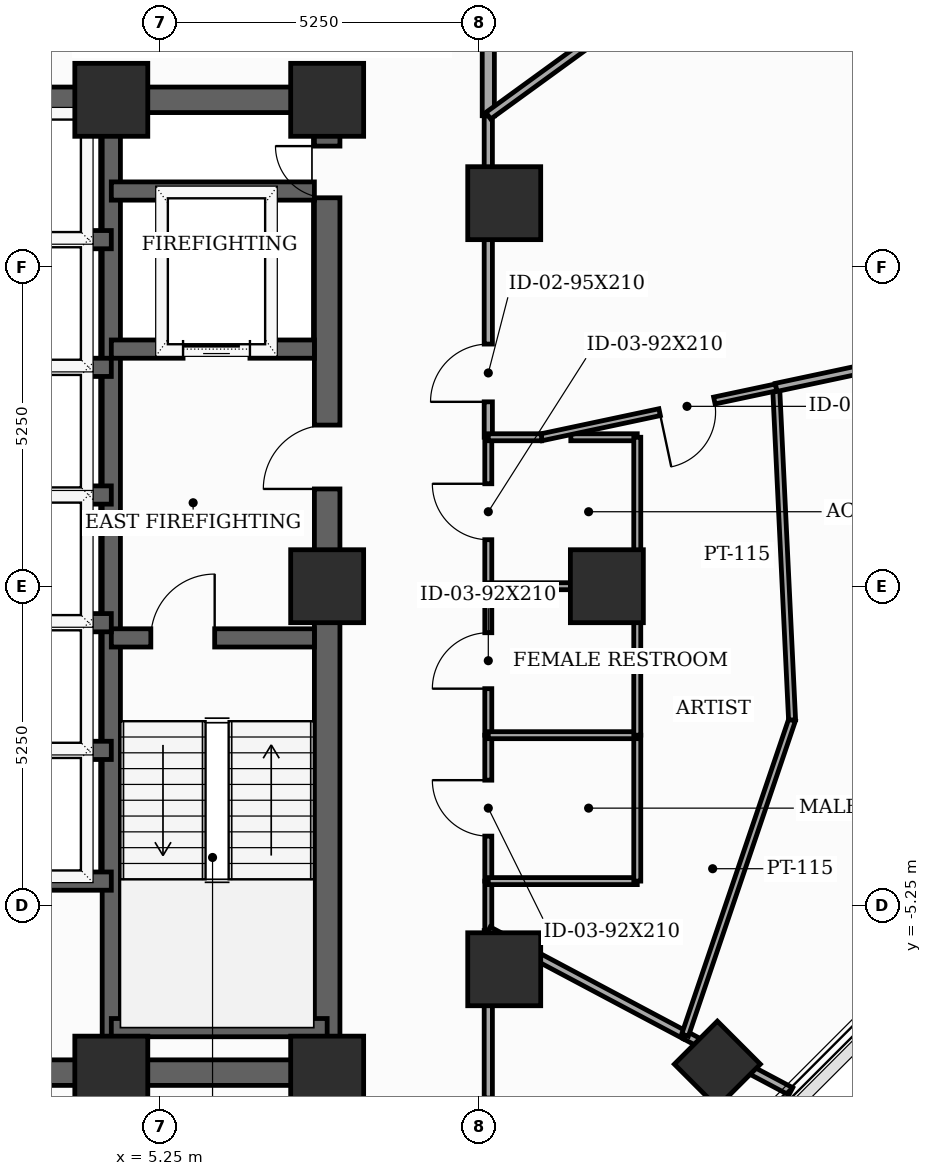
"""IFC4 building model, lengths in metres.
Left out: names, types, materials, properties, quantities, classifications, styles, units other than length and angle.
Written with IfcOpenShell. Run it as: python <this file> out.ifc"""

import sys

from ifc_helpers import new_model, si_unit, direction, frame, frame_2d, origin, origin_2d, place, context, subcontext, project, spatial, rectangle, extrude, element, fill, save


model = new_model("IFC4")
c1 = context("Model", 3, precision=1e-05, world=origin(), true_north=direction((0.0, 1.0)))
c2 = subcontext(c1, "Body", "Model", "MODEL_VIEW")
j1 = project(units=[si_unit("LENGTHUNIT", "METRE"), si_unit("PLANEANGLEUNIT", "RADIAN")], contexts=[c1])
p1 = place(None, origin())
s1 = spatial("IfcSite", under=j1, at=p1, CompositionType="ELEMENT")
p2 = place(p1, origin())
s2 = spatial("IfcBuilding", under=s1, at=p2, CompositionType="ELEMENT")
p3 = place(p2, frame((0.0, 0.0, 191.6)))
s3 = spatial("IfcBuildingStorey", under=s2, at=p3, CompositionType="ELEMENT", Elevation=191.6)
for number, where, z_axis, x_axis in (
    (1, (4.45, -8.0, 0.0), (0.0, 0.0, 1.0), (1.0, 0.0, 0.0)),
    (2, (8.0, -8.0, 0.0), (0.0, 0.0, 1.0), (1.0, 0.0, 0.0)),
    (3, (8.0, 0.0, 0.0), (0.0, 0.0, 1.0), (1.0, 0.0, 0.0)),
    (4, (8.0, 8.0, 0.0), (0.0, 0.0, 1.0), (1.0, 0.0, 0.0)),
    (5, (4.45, 8.0, 0.0), (0.0, 0.0, 1.0), (1.0, 0.0, 0.0)),
    (6, (12.6, 0.0, 0.0), (0.0, 0.0, 1.0), (1.0, 0.0, 0.0)),
    (7, (10.912, 6.3, 0.0), (0.0, 0.0, 1.0), (1.0, 0.0, 0.0)),
    (8, (10.912, -6.3, 0.0), (0.0, 0.0, 1.0), (1.0, 0.0, 0.0)),
):
    element("IfcColumn", number, at=place(p3, frame(where, z_axis=z_axis, x_axis=x_axis)), inside=s3, PredefinedType="COLUMN", context=c2, shape_type="SweptSolid", body=[
        extrude(rectangle(XDim=1.2, YDim=1.2, at=origin_2d()), origin(), (0.0, 0.0, 1.0), 3.7),
    ])
p4 = place(p3, frame((14.417, -7.861, 0.0), z_axis=(0.0, 0.0, 1.0), x_axis=(0.707106781187, 0.707106781187, 0.0)))
e9 = element("IfcColumn", 9, at=p4, inside=s3, PredefinedType="COLUMN", context=c2, shape_type="SweptSolid", body=[
    extrude(rectangle(XDim=1.0, YDim=1.0, at=origin_2d()), origin(), (0.0, 0.0, 1.0), 3.7),
])
p5 = place(p3, frame((8.0, -8.0, 0.0), z_axis=(0.0, 0.0, 1.0), x_axis=(0.0, 1.0, 0.0)))
e10 = element("IfcWall", 10, at=p5, inside=s3, PredefinedType="SHEAR", context=c2, shape_type="SweptSolid", body=[
    extrude(rectangle(XDim=16.0, YDim=0.42, at=frame_2d((8.0, 0.0))), origin(), (0.0, 0.0, 1.0), 3.5),
])
p6 = place(p5, frame((9.6, 0.0, 0.0)))
e11 = element("IfcOpeningElement", 11, at=p6, cuts=e10, PredefinedType="OPENING", context=c2, shape_type="SweptSolid", body=[
    extrude(rectangle(XDim=1.05, YDim=2.15, at=frame_2d((0.525, 1.075))), frame((0.0, 0.22, 0.0), z_axis=(0.0, -1.0, 0.0), x_axis=(1.0, 0.0, 0.0)), (0.0, 0.0, 1.0), 0.44),
])
p7 = place(p5, frame((14.389, 0.0, 0.0)))
e12 = element("IfcOpeningElement", 12, at=p7, cuts=e10, PredefinedType="OPENING", context=c2, shape_type="SweptSolid", body=[
    extrude(rectangle(XDim=0.85, YDim=2.02, at=frame_2d((0.425, 1.01))), frame((0.0, 0.22, 0.0), z_axis=(0.0, -1.0, 0.0), x_axis=(1.0, 0.0, 0.0)), (0.0, 0.0, 1.0), 0.44),
])
p8 = place(p3, frame((-8.0, -8.0, 0.0), z_axis=(0.0, 0.0, 1.0), x_axis=(1.0, 0.0, 0.0)))
e13 = element("IfcWall", 13, at=p8, inside=s3, PredefinedType="SHEAR", context=c2, shape_type="SweptSolid", body=[
    extrude(rectangle(XDim=16.0, YDim=0.42, at=frame_2d((8.0, 0.0))), origin(), (0.0, 0.0, 1.0), 3.5),
])
p9 = place(p8, frame((5.2, 0.0, 0.0)))
e14 = element("IfcOpeningElement", 14, at=p9, cuts=e13, PredefinedType="OPENING", context=c2, shape_type="SweptSolid", body=[
    extrude(rectangle(XDim=0.95, YDim=2.1, at=frame_2d((0.475, 1.05))), frame((0.0, 0.22, 0.0), z_axis=(0.0, -1.0, 0.0), x_axis=(1.0, 0.0, 0.0)), (0.0, 0.0, 1.0), 0.44),
])
p10 = place(p8, frame((9.8, 0.0, 0.0)))
e15 = element("IfcOpeningElement", 15, at=p10, cuts=e13, PredefinedType="OPENING", context=c2, shape_type="SweptSolid", body=[
    extrude(rectangle(XDim=0.95, YDim=2.1, at=frame_2d((0.475, 1.05))), frame((0.0, 0.22, 0.0), z_axis=(0.0, -1.0, 0.0), x_axis=(1.0, 0.0, 0.0)), (0.0, 0.0, 1.0), 0.44),
])
p11 = place(p3, frame((-8.0, 8.0, 0.0), z_axis=(0.0, 0.0, 1.0), x_axis=(1.0, 0.0, 0.0)))
e16 = element("IfcWall", 16, at=p11, inside=s3, PredefinedType="SHEAR", context=c2, shape_type="SweptSolid", body=[
    extrude(rectangle(XDim=16.0, YDim=0.42, at=frame_2d((8.0, 0.0))), origin(), (0.0, 0.0, 1.0), 3.5),
])
p12 = place(p11, frame((7.1, 0.0, 0.0)))
e17 = element("IfcOpeningElement", 17, at=p12, cuts=e16, PredefinedType="OPENING", context=c2, shape_type="SweptSolid", body=[
    extrude(rectangle(XDim=1.8, YDim=2.15, at=frame_2d((0.9, 1.075))), frame((0.0, 0.22, 0.0), z_axis=(0.0, -1.0, 0.0), x_axis=(1.0, 0.0, 0.0)), (0.0, 0.0, 1.0), 0.44),
])
p13 = place(p3, frame((4.45, -7.79, 0.0), z_axis=(0.0, 0.0, 1.0), x_axis=(0.0, 1.0, 0.0)))
e18 = element("IfcWall", 18, at=p13, inside=s3, PredefinedType="SHEAR", context=c2, shape_type="SweptSolid", body=[
    extrude(rectangle(XDim=15.58, YDim=0.3, at=frame_2d((7.79, 0.0))), origin(), (0.0, 0.0, 1.0), 3.5),
])
p14 = place(p3, frame((4.45, -0.85, 0.0), z_axis=(0.0, 0.0, 1.0), x_axis=(1.0, 0.0, 0.0)))
e19 = element("IfcWall", 19, at=p14, inside=s3, PredefinedType="SHEAR", context=c2, shape_type="SweptSolid", body=[
    extrude(rectangle(XDim=3.34, YDim=0.3, at=frame_2d((1.67, 0.0))), origin(), (0.0, 0.0, 1.0), 3.5),
])
p15 = place(p14, frame((0.65, 0.0, 0.0)))
e20 = element("IfcOpeningElement", 20, at=p15, cuts=e19, PredefinedType="OPENING", context=c2, shape_type="SweptSolid", body=[
    extrude(rectangle(XDim=1.05, YDim=2.15, at=frame_2d((0.525, 1.075))), frame((0.0, 0.16, 0.0), z_axis=(0.0, -1.0, 0.0), x_axis=(1.0, 0.0, 0.0)), (0.0, 0.0, 1.0), 0.32),
])
p16 = place(p3, frame((4.45, -7.26, 0.0), z_axis=(0.0, 0.0, 1.0), x_axis=(1.0, 0.0, 0.0)))
e21 = element("IfcWall", 21, at=p16, inside=s3, PredefinedType="SHEAR", context=c2, shape_type="SweptSolid", body=[
    extrude(rectangle(XDim=3.55, YDim=0.3, at=frame_2d((1.775, 0.0))), origin(), (0.0, 0.0, 1.0), 3.5),
])
p17 = place(p3, frame((4.45, 3.9, 0.0), z_axis=(0.0, 0.0, 1.0), x_axis=(1.0, 0.0, 0.0)))
e22 = element("IfcWall", 22, at=p17, inside=s3, PredefinedType="SHEAR", context=c2, shape_type="SweptSolid", body=[
    extrude(rectangle(XDim=3.34, YDim=0.3, at=frame_2d((1.67, 0.0))), origin(), (0.0, 0.0, 1.0), 3.5),
])
p18 = place(p17, frame((1.18, 0.0, 0.0)))
e23 = element("IfcOpeningElement", 23, at=p18, cuts=e22, PredefinedType="OPENING", context=c2, shape_type="SweptSolid", body=[
    extrude(rectangle(XDim=1.1, YDim=2.1, at=frame_2d((0.55, 1.05))), frame((0.0, 0.16, 0.0), z_axis=(0.0, -1.0, 0.0), x_axis=(1.0, 0.0, 0.0)), (0.0, 0.0, 1.0), 0.32),
])
p19 = place(p3, frame((4.45, 6.5, 0.0), z_axis=(0.0, 0.0, 1.0), x_axis=(1.0, 0.0, 0.0)))
e24 = element("IfcWall", 24, at=p19, inside=s3, PredefinedType="SHEAR", context=c2, shape_type="SweptSolid", body=[
    extrude(rectangle(XDim=3.34, YDim=0.3, at=frame_2d((1.67, 0.0))), origin(), (0.0, 0.0, 1.0), 3.5),
])
p20 = place(p3, frame((-4.45, -4.85, 0.0), z_axis=(0.0, 0.0, 1.0), x_axis=(1.0, 0.0, 0.0)))
e25 = element("IfcWall", 25, at=p20, inside=s3, PredefinedType="SHEAR", context=c2, shape_type="SweptSolid", body=[
    extrude(rectangle(XDim=8.9, YDim=0.3, at=frame_2d((4.45, 0.0))), origin(), (0.0, 0.0, 1.0), 3.5),
])
for number, where, z_axis, x_axis in (
    (26, (1.68, 1.5, 0.0), (0.0, 0.0, 1.0), (1.0, 0.0, 0.0)),
    (27, (1.68, 3.6, 0.0), (0.0, 0.0, 1.0), (1.0, 0.0, 0.0)),
    (28, (1.68, 5.7, 0.0), (0.0, 0.0, 1.0), (1.0, 0.0, 0.0)),
    (29, (1.68, -2.7, 0.0), (0.0, 0.0, 1.0), (1.0, 0.0, 0.0)),
    (30, (1.68, -0.6, 0.0), (0.0, 0.0, 1.0), (1.0, 0.0, 0.0)),
):
    element("IfcWall", number, at=place(p3, frame(where, z_axis=z_axis, x_axis=x_axis)), inside=s3, PredefinedType="SHEAR", context=c2, shape_type="SweptSolid", body=[
        extrude(rectangle(XDim=2.77, YDim=0.3, at=frame_2d((1.385, 0.0))), origin(), (0.0, 0.0, 1.0), 3.5),
    ])
p21 = place(p3, frame((10.65, -10.15, 0.0), z_axis=(0.0, 0.0, 1.0), x_axis=(0.0, 1.0, 0.0)))
e31 = element("IfcWall", 31, at=p21, inside=s3, PredefinedType="PARTITIONING", context=c2, shape_type="SweptSolid", body=[
    extrude(rectangle(XDim=4.487, YDim=0.135, at=frame_2d((2.243, 0.0))), origin(), (0.0, 0.0, 1.0), 2.885),
])
p22 = place(p21, frame((0.781, 0.0, 0.0)))
e32 = element("IfcOpeningElement", 32, at=p22, cuts=e31, PredefinedType="OPENING", context=c2, shape_type="SweptSolid", body=[
    extrude(rectangle(XDim=0.95, YDim=2.1, at=frame_2d((0.475, 1.05))), frame((0.0, 0.077, 0.0), z_axis=(0.0, -1.0, 0.0), x_axis=(1.0, 0.0, 0.0)), (0.0, 0.0, 1.0), 0.155),
])
p23 = place(p3, frame((10.65, -4.85, 0.0), z_axis=(0.0, 0.0, 1.0), x_axis=(0.0, 1.0, 0.0)))
e33 = element("IfcWall", 33, at=p23, inside=s3, PredefinedType="PARTITIONING", context=c2, shape_type="SweptSolid", body=[
    extrude(rectangle(XDim=2.4, YDim=0.115, at=frame_2d((1.2, 0.0))), origin(), (0.0, 0.0, 1.0), 3.5),
])
p24 = place(p23, frame((0.74, 0.0, 0.0)))
e34 = element("IfcOpeningElement", 34, at=p24, cuts=e33, PredefinedType="OPENING", context=c2, shape_type="SweptSolid", body=[
    extrude(rectangle(XDim=0.92, YDim=2.1, at=frame_2d((0.46, 1.05))), frame((0.0, 0.067, 0.0), z_axis=(0.0, -1.0, 0.0), x_axis=(1.0, 0.0, 0.0)), (0.0, 0.0, 1.0), 0.135),
])
p25 = place(p3, frame((10.65, -5.663, 0.0), z_axis=(0.0, 0.0, 1.0), x_axis=(0.0, 1.0, 0.0)))
e35 = element("IfcWall", 35, at=p25, inside=s3, PredefinedType="PARTITIONING", context=c2, shape_type="SweptSolid", body=[
    extrude(rectangle(XDim=0.813, YDim=0.115, at=frame_2d((0.406, 0.0))), origin(), (0.0, 0.0, 1.0), 3.5),
])
p26 = place(p3, frame((10.65, -2.45, 0.0), z_axis=(0.0, 0.0, 1.0), x_axis=(0.0, 1.0, 0.0)))
e36 = element("IfcWall", 36, at=p26, inside=s3, PredefinedType="PARTITIONING", context=c2, shape_type="SweptSolid", body=[
    extrude(rectangle(XDim=2.45, YDim=0.115, at=frame_2d((1.225, 0.0))), origin(), (0.0, 0.0, 1.0), 2.885),
])
p27 = place(p26, frame((0.765, 0.0, 0.0)))
e37 = element("IfcOpeningElement", 37, at=p27, cuts=e36, PredefinedType="OPENING", context=c2, shape_type="SweptSolid", body=[
    extrude(rectangle(XDim=0.92, YDim=2.1, at=frame_2d((0.46, 1.05))), frame((0.0, 0.067, 0.0), z_axis=(0.0, -1.0, 0.0), x_axis=(1.0, 0.0, 0.0)), (0.0, 0.0, 1.0), 0.135),
])
p28 = place(p3, frame((10.65, 0.0, 0.0), z_axis=(0.0, 0.0, 1.0), x_axis=(0.0, 1.0, 0.0)))
e38 = element("IfcWall", 38, at=p28, inside=s3, PredefinedType="PARTITIONING", context=c2, shape_type="SweptSolid", body=[
    extrude(rectangle(XDim=2.45, YDim=0.115, at=frame_2d((1.225, 0.0))), origin(), (0.0, 0.0, 1.0), 2.885),
])
p29 = place(p28, frame((0.765, 0.0, 0.0)))
e39 = element("IfcOpeningElement", 39, at=p29, cuts=e38, PredefinedType="OPENING", context=c2, shape_type="SweptSolid", body=[
    extrude(rectangle(XDim=0.92, YDim=2.1, at=frame_2d((0.46, 1.05))), frame((0.0, 0.067, 0.0), z_axis=(0.0, -1.0, 0.0), x_axis=(1.0, 0.0, 0.0)), (0.0, 0.0, 1.0), 0.135),
])
p30 = place(p3, frame((10.65, 2.45, 0.0), z_axis=(0.0, 0.0, 1.0), x_axis=(0.0, 1.0, 0.0)))
e40 = element("IfcWall", 40, at=p30, inside=s3, PredefinedType="PARTITIONING", context=c2, shape_type="SweptSolid", body=[
    extrude(rectangle(XDim=5.288, YDim=0.135, at=frame_2d((2.644, 0.0))), origin(), (0.0, 0.0, 1.0), 2.885),
])
p31 = place(p30, frame((0.583, 0.0, 0.0)))
e41 = element("IfcOpeningElement", 41, at=p31, cuts=e40, PredefinedType="OPENING", context=c2, shape_type="SweptSolid", body=[
    extrude(rectangle(XDim=0.95, YDim=2.1, at=frame_2d((0.475, 1.05))), frame((0.0, 0.077, 0.0), z_axis=(0.0, -1.0, 0.0), x_axis=(1.0, 0.0, 0.0)), (0.0, 0.0, 1.0), 0.155),
])
p32 = place(p3, frame((10.65, 7.738, 0.0), z_axis=(0.0, 0.0, 1.0), x_axis=(0.0, 1.0, 0.0)))
e42 = element("IfcWall", 42, at=p32, inside=s3, PredefinedType="SOLIDWALL", context=c2, shape_type="SweptSolid", body=[
    extrude(rectangle(XDim=2.412, YDim=0.2, at=frame_2d((1.206, 0.0))), origin(), (0.0, 0.0, 1.0), 3.5),
])
p33 = place(p3, frame((13.886, -7.383, 0.0), z_axis=(0.0, 0.0, 1.0), x_axis=(-0.88302513666, 0.469325695041, 0.0)))
e43 = element("IfcWall", 43, at=p33, inside=s3, PredefinedType="PARTITIONING", context=c2, shape_type="SweptSolid", body=[
    extrude(rectangle(XDim=3.665, YDim=0.135, at=frame_2d((1.833, 0.0))), origin(), (0.0, 0.0, 1.0), 2.885),
])
p34 = place(p3, frame((15.625, -8.308, 0.0), z_axis=(0.0, 0.0, 1.0), x_axis=(-0.882966413063, 0.469436165418, 0.0)))
e44 = element("IfcWall", 44, at=p34, inside=s3, PredefinedType="PARTITIONING", context=c2, shape_type="SweptSolid", body=[
    extrude(rectangle(XDim=1.969, YDim=0.135, at=frame_2d((0.985, 0.0))), origin(), (0.0, 0.0, 1.0), 2.985),
])
p35 = place(p3, frame((10.65, -4.85, 0.0), z_axis=(0.0, 0.0, 1.0), x_axis=(1.0, 0.0, 0.0)))
e45 = element("IfcWall", 45, at=p35, inside=s3, PredefinedType="PARTITIONING", context=c2, shape_type="SweptSolid", body=[
    extrude(rectangle(XDim=2.45, YDim=0.115, at=frame_2d((1.225, 0.0))), origin(), (0.0, 0.0, 1.0), 2.885),
])
p36 = place(p3, frame((13.1, -4.85, 0.0), z_axis=(0.0, 0.0, 1.0), x_axis=(0.0, 1.0, 0.0)))
e46 = element("IfcWall", 46, at=p36, inside=s3, PredefinedType="PARTITIONING", context=c2, shape_type="SweptSolid", body=[
    extrude(rectangle(XDim=2.4, YDim=0.115, at=frame_2d((1.2, 0.0))), origin(), (0.0, 0.0, 1.0), 3.5),
])
p37 = place(p3, frame((13.1, -2.45, 0.0), z_axis=(0.0, 0.0, 1.0), x_axis=(-1.0, 0.0, 0.0)))
e47 = element("IfcWall", 47, at=p37, inside=s3, PredefinedType="PARTITIONING", context=c2, shape_type="SweptSolid", body=[
    extrude(rectangle(XDim=2.45, YDim=0.115, at=frame_2d((1.225, 0.0))), origin(), (0.0, 0.0, 1.0), 2.885),
])
p38 = place(p3, frame((13.1, 0.0, 0.0), z_axis=(0.0, 0.0, 1.0), x_axis=(0.0, -1.0, 0.0)))
e48 = element("IfcWall", 48, at=p38, inside=s3, PredefinedType="PARTITIONING", context=c2, shape_type="SweptSolid", body=[
    extrude(rectangle(XDim=2.45, YDim=0.115, at=frame_2d((1.225, 0.0))), origin(), (0.0, 0.0, 1.0), 2.985),
])
p39 = place(p3, frame((13.886, -7.383, 0.0), z_axis=(0.0, 0.0, 1.0), x_axis=(0.321480582018, 0.946916171255, 0.0)))
e49 = element("IfcWall", 49, at=p39, inside=s3, PredefinedType="PARTITIONING", context=c2, shape_type="SweptSolid", body=[
    extrude(rectangle(XDim=5.475, YDim=0.115, at=frame_2d((2.737, 0.0))), origin(), (0.0, 0.0, 1.0), 3.5),
])
p40 = place(p3, frame((15.646, -2.199, 0.0), z_axis=(0.0, 0.0, 1.0), x_axis=(-0.047844791808, 0.998854782187, 0.0)))
e50 = element("IfcWall", 50, at=p40, inside=s3, PredefinedType="PARTITIONING", context=c2, shape_type="SweptSolid", body=[
    extrude(rectangle(XDim=5.475, YDim=0.115, at=frame_2d((2.738, 0.0))), origin(), (0.0, 0.0, 1.0), 2.985),
])
p41 = place(p3, frame((12.007, 2.45, 0.0), z_axis=(0.0, 0.0, 1.0), x_axis=(1.0, 0.0, 0.0)))
e51 = element("IfcWall", 51, at=p41, inside=s3, PredefinedType="PARTITIONING", context=c2, shape_type="SweptSolid", body=[
    extrude(rectangle(XDim=1.093, YDim=0.115, at=frame_2d((0.546, 0.0))), origin(), (0.0, 0.0, 1.0), 2.885),
])
p42 = place(p3, frame((13.1, 2.45, 0.0), z_axis=(0.0, 0.0, 1.0), x_axis=(0.0, -1.0, 0.0)))
e52 = element("IfcWall", 52, at=p42, inside=s3, PredefinedType="PARTITIONING", context=c2, shape_type="SweptSolid", body=[
    extrude(rectangle(XDim=2.45, YDim=0.115, at=frame_2d((1.225, 0.0))), origin(), (0.0, 0.0, 1.0), 2.985),
])
p43 = place(p3, frame((15.384, 3.27, 0.0), z_axis=(0.0, 0.0, 1.0), x_axis=(-0.978147995284, -0.207909834598, 0.0)))
e53 = element("IfcWall", 53, at=p43, inside=s3, PredefinedType="PARTITIONING", context=c2, shape_type="SweptSolid", body=[
    extrude(rectangle(XDim=3.944, YDim=0.115, at=frame_2d((1.972, 0.0))), origin(), (0.0, 0.0, 1.0), 2.885),
])
p44 = place(p43, frame((1.039, 0.0, 0.0)))
e54 = element("IfcOpeningElement", 54, at=p44, cuts=e53, PredefinedType="OPENING", context=c2, shape_type="SweptSolid", body=[
    extrude(rectangle(XDim=0.92, YDim=2.1, at=frame_2d((0.46, 1.05))), frame((0.0, 0.067, 0.0), z_axis=(0.0, -1.0, 0.0), x_axis=(1.0, 0.0, 0.0)), (0.0, 0.0, 1.0), 0.135),
])
p45 = place(p3, frame((13.1, 0.0, 0.0), z_axis=(0.0, 0.0, 1.0), x_axis=(-1.0, 0.0, 0.0)))
e55 = element("IfcWall", 55, at=p45, inside=s3, PredefinedType="PARTITIONING", context=c2, shape_type="SweptSolid", body=[
    extrude(rectangle(XDim=2.45, YDim=0.115, at=frame_2d((1.225, 0.0))), origin(), (0.0, 0.0, 1.0), 2.885),
])
p46 = place(p3, frame((29.271, 6.221, 0.0), z_axis=(0.0, 0.0, 1.0), x_axis=(-0.978151114267, -0.207895160259, 0.0)))
e56 = element("IfcWall", 56, at=p46, inside=s3, PredefinedType="PARTITIONING", context=c2, shape_type="SweptSolid", body=[
    extrude(rectangle(XDim=14.197, YDim=0.135, at=frame_2d((7.098, 0.0))), origin(), (0.0, 0.0, 1.0), 2.985),
])
p47 = place(p46, frame((6.638, 0.0, 0.0)))
e57 = element("IfcOpeningElement", 57, at=p47, cuts=e56, PredefinedType="OPENING", context=c2, shape_type="SweptSolid", body=[
    extrude(rectangle(XDim=0.92, YDim=2.1, at=frame_2d((0.46, 1.05))), frame((0.0, 0.077, 0.0), z_axis=(0.0, -1.0, 0.0), x_axis=(1.0, 0.0, 0.0)), (0.0, 0.0, 1.0), 0.155),
])
p48 = place(p3, frame((11.526, 2.45, 0.0), z_axis=(0.0, 0.0, 1.0), x_axis=(-1.0, 0.0, 0.0)))
e58 = element("IfcWall", 58, at=p48, inside=s3, PredefinedType="PARTITIONING", context=c2, shape_type="SweptSolid", body=[
    extrude(rectangle(XDim=0.876, YDim=0.115, at=frame_2d((0.438, 0.0))), origin(), (0.0, 0.0, 1.0), 3.5),
])
p49 = place(p3, frame((12.738, 9.255, 0.0), z_axis=(0.0, 0.0, 1.0), x_axis=(-0.809067292609, -0.587716016483, 0.0)))
e59 = element("IfcWall", 59, at=p49, inside=s3, PredefinedType="PARTITIONING", context=c2, shape_type="SweptSolid", body=[
    extrude(rectangle(XDim=2.581, YDim=0.135, at=frame_2d((1.291, 0.0))), origin(), (0.0, 0.0, 1.0), 3.5),
])
p50 = place(p6, origin())
e60 = element("IfcDoor", 60, at=p50, inside=s3, OperationType="SINGLE_SWING_LEFT", PredefinedType="DOOR", context=c2, shape_type="SweptSolid", body=[
    extrude(rectangle(XDim=1.05, YDim=2.15, at=frame_2d((0.525, 1.075))), frame((0.0, 0.025, 0.0), z_axis=(0.0, -1.0, 0.0), x_axis=(1.0, 0.0, 0.0)), (0.0, 0.0, 1.0), 0.05),
])
fill(e11, e60)
p51 = place(p7, origin())
e61 = element("IfcDoor", 61, at=p51, inside=s3, OperationType="SINGLE_SWING_RIGHT", PredefinedType="TRAPDOOR", context=c2, shape_type="SweptSolid", body=[
    extrude(rectangle(XDim=0.85, YDim=2.02, at=frame_2d((0.425, 1.01))), frame((0.0, 0.025, 0.0), z_axis=(0.0, -1.0, 0.0), x_axis=(1.0, 0.0, 0.0)), (0.0, 0.0, 1.0), 0.05),
])
fill(e12, e61)
p52 = place(p15, origin())
e62 = element("IfcDoor", 62, at=p52, inside=s3, OperationType="SINGLE_SWING_RIGHT", PredefinedType="DOOR", context=c2, shape_type="SweptSolid", body=[
    extrude(rectangle(XDim=1.05, YDim=2.15, at=frame_2d((0.525, 1.075))), frame((0.0, 0.025, 0.0), z_axis=(0.0, -1.0, 0.0), x_axis=(1.0, 0.0, 0.0)), (0.0, 0.0, 1.0), 0.05),
])
fill(e20, e62)
p53 = place(p18, origin())
e63 = element("IfcDoor", 63, at=p53, inside=s3, OperationType="SLIDING_TO_LEFT", PredefinedType="DOOR", context=c2, shape_type="SweptSolid", body=[
    extrude(rectangle(XDim=1.1, YDim=2.1, at=frame_2d((0.55, 1.05))), frame((0.0, 0.025, 0.0), z_axis=(0.0, -1.0, 0.0), x_axis=(1.0, 0.0, 0.0)), (0.0, 0.0, 1.0), 0.05),
])
fill(e23, e63)
p54 = place(p24, origin())
e64 = element("IfcDoor", 64, at=p54, inside=s3, OperationType="SINGLE_SWING_RIGHT", PredefinedType="DOOR", context=c2, shape_type="SweptSolid", body=[
    extrude(rectangle(XDim=0.92, YDim=2.1, at=frame_2d((0.46, 1.05))), frame((0.0, 0.025, 0.0), z_axis=(0.0, -1.0, 0.0), x_axis=(1.0, 0.0, 0.0)), (0.0, 0.0, 1.0), 0.05),
])
fill(e34, e64)
p55 = place(p27, origin())
e65 = element("IfcDoor", 65, at=p55, inside=s3, OperationType="SINGLE_SWING_LEFT", PredefinedType="DOOR", context=c2, shape_type="SweptSolid", body=[
    extrude(rectangle(XDim=0.92, YDim=2.1, at=frame_2d((0.46, 1.05))), frame((0.0, 0.025, 0.0), z_axis=(0.0, -1.0, 0.0), x_axis=(1.0, 0.0, 0.0)), (0.0, 0.0, 1.0), 0.05),
])
fill(e37, e65)
p56 = place(p29, origin())
e66 = element("IfcDoor", 66, at=p56, inside=s3, OperationType="SINGLE_SWING_RIGHT", PredefinedType="DOOR", context=c2, shape_type="SweptSolid", body=[
    extrude(rectangle(XDim=0.92, YDim=2.1, at=frame_2d((0.46, 1.05))), frame((0.0, 0.025, 0.0), z_axis=(0.0, -1.0, 0.0), x_axis=(1.0, 0.0, 0.0)), (0.0, 0.0, 1.0), 0.05),
])
fill(e39, e66)
p57 = place(p31, origin())
e67 = element("IfcDoor", 67, at=p57, inside=s3, OperationType="SINGLE_SWING_LEFT", PredefinedType="DOOR", context=c2, shape_type="SweptSolid", body=[
    extrude(rectangle(XDim=0.95, YDim=2.1, at=frame_2d((0.475, 1.05))), frame((0.0, 0.025, 0.0), z_axis=(0.0, -1.0, 0.0), x_axis=(1.0, 0.0, 0.0)), (0.0, 0.0, 1.0), 0.05),
])
fill(e41, e67)
p58 = place(p44, origin())
e68 = element("IfcDoor", 68, at=p58, inside=s3, OperationType="SINGLE_SWING_RIGHT", PredefinedType="DOOR", context=c2, shape_type="SweptSolid", body=[
    extrude(rectangle(XDim=0.92, YDim=2.1, at=frame_2d((0.46, 1.05))), frame((0.0, 0.025, 0.0), z_axis=(0.0, -1.0, 0.0), x_axis=(1.0, 0.0, 0.0)), (0.0, 0.0, 1.0), 0.05),
])
fill(e54, e68)
save(model, sys.argv[1])
